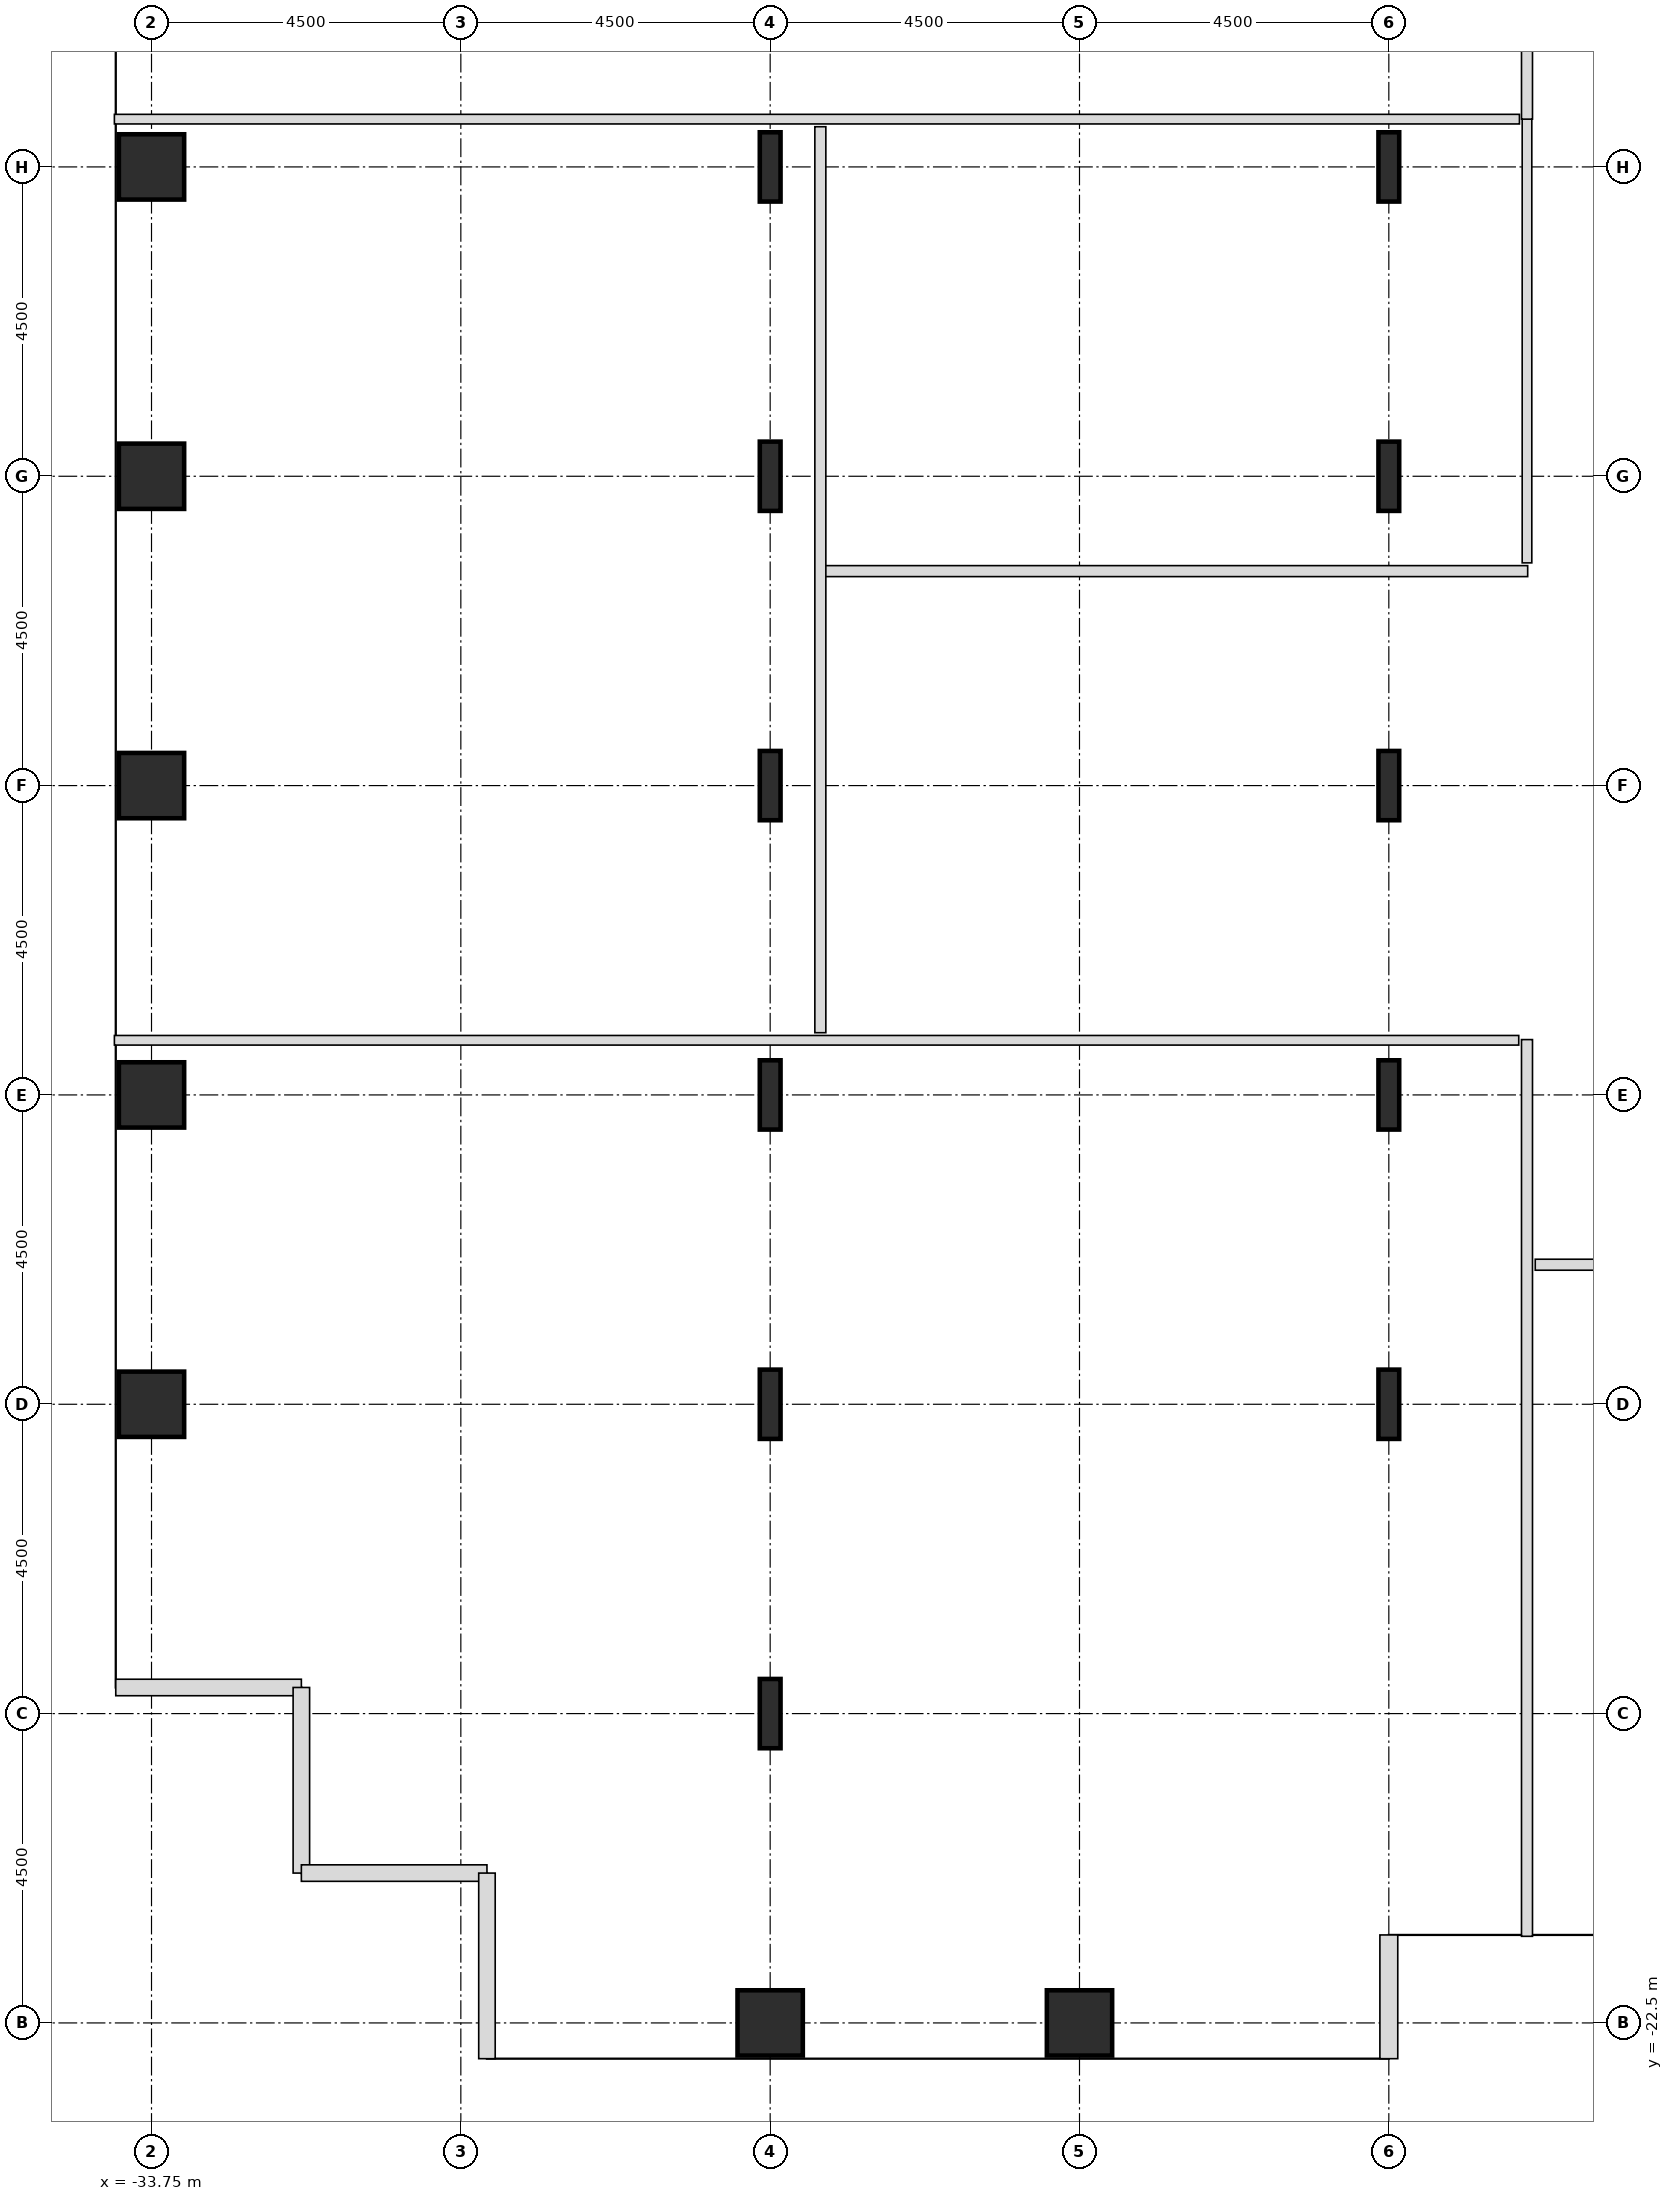
"""IFC4 building model, lengths in metres.
Left out: names, types, materials, properties, quantities, classifications, styles, units other than length and angle.
Written with IfcOpenShell. Run it as: python <this file> out.ifc"""

import sys

from ifc_helpers import new_model, si_unit, direction, frame, frame_2d, origin, origin_2d, place, context, subcontext, project, spatial, rectangle, hollow_rectangle, i_section, extrude, source, transform, mapped, element, fill, save


model = new_model("IFC4")
c1 = context("Model", 3, precision=1e-05, world=origin(), true_north=direction((0.0, 1.0)))
c2 = subcontext(c1, "Body", "Model", "MODEL_VIEW")
j1 = project(units=[si_unit("LENGTHUNIT", "METRE"), si_unit("PLANEANGLEUNIT", "RADIAN")], contexts=[c1])
p1 = place(None, origin())
s1 = spatial("IfcSite", under=j1, at=p1, CompositionType="ELEMENT")
p2 = place(p1, origin())
s2 = spatial("IfcBuilding", under=s1, at=p2, CompositionType="ELEMENT")
p3 = place(p2, frame((0.0, 0.0, 40.6)))
s3 = spatial("IfcBuildingStorey", under=s2, at=p3, CompositionType="ELEMENT", Elevation=40.6)
m1 = source(origin(), c2, "Body", "SweptSolid", [
    extrude(hollow_rectangle(XDim=0.95, YDim=0.95, WallThickness=0.045, InnerFilletRadius=0.045, OuterFilletRadius=0.09, at=origin_2d()), origin(), (0.0, 0.0, 1.0), 3.8),
])
for number, where, z_axis, x_axis in (
    (1, (-33.75, -13.5, 0.0), (0.0, 0.0, 1.0), (1.0, 0.0, 0.0)),
    (2, (-33.75, -9.0, 0.0), (0.0, 0.0, 1.0), (1.0, 0.0, 0.0)),
    (3, (-33.75, -4.5, 0.0), (0.0, 0.0, 1.0), (1.0, 0.0, 0.0)),
    (4, (-33.75, 0.0, 0.0), (0.0, 0.0, 1.0), (1.0, 0.0, 0.0)),
    (5, (-33.75, 4.5, 0.0), (0.0, 0.0, 1.0), (1.0, 0.0, 0.0)),
    (6, (-24.75, -22.5, 0.0), (0.0, 0.0, 1.0), (1.0, 0.0, 0.0)),
):
    element("IfcColumn", number, at=place(p3, frame(where, z_axis=z_axis, x_axis=x_axis)), inside=s3, PredefinedType="COLUMN", context=c2, shape_type="MappedRepresentation", body=[
        mapped(m1, transform((0.0, 0.0, 0.0), x_axis=(1.0, 0.0, 0.0), y_axis=(0.0, 1.0, 0.0), z_axis=(0.0, 0.0, 1.0), scale=1.0)),
    ])
m2 = source(origin(), c2, "Body", "SweptSolid", [
    extrude(i_section(OverallWidth=0.302, OverallDepth=1.008, WebThickness=0.021, FlangeThickness=0.04, FilletRadius=0.03, at=origin_2d()), origin(), (0.0, 0.0, 1.0), 3.8),
])
for number, where, z_axis, x_axis in (
    (7, (-24.75, -18.0, 0.0), (0.0, 0.0, 1.0), (1.0, 0.0, 0.0)),
    (8, (-24.75, -13.5, 0.0), (0.0, 0.0, 1.0), (1.0, 0.0, 0.0)),
    (9, (-24.75, -9.0, 0.0), (0.0, 0.0, 1.0), (1.0, 0.0, 0.0)),
    (10, (-24.75, -4.5, 0.0), (0.0, 0.0, 1.0), (1.0, 0.0, 0.0)),
    (11, (-24.75, 0.0, 0.0), (0.0, 0.0, 1.0), (1.0, 0.0, 0.0)),
    (12, (-24.75, 4.5, 0.0), (0.0, 0.0, 1.0), (1.0, 0.0, 0.0)),
):
    element("IfcColumn", number, at=place(p3, frame(where, z_axis=z_axis, x_axis=x_axis)), inside=s3, PredefinedType="COLUMN", context=c2, shape_type="MappedRepresentation", body=[
        mapped(m2, transform((0.0, 0.0, 0.0), x_axis=(1.0, 0.0, 0.0), y_axis=(0.0, 1.0, 0.0), z_axis=(0.0, 0.0, 1.0), scale=1.0)),
    ])
p4 = place(p3, frame((-20.25, -22.5, 0.0), z_axis=(0.0, 0.0, 1.0), x_axis=(1.0, 0.0, 0.0)))
e13 = element("IfcColumn", 13, at=p4, inside=s3, PredefinedType="COLUMN", context=c2, shape_type="MappedRepresentation", body=[
    mapped(m1, transform((0.0, 0.0, 0.0), x_axis=(1.0, 0.0, 0.0), y_axis=(0.0, 1.0, 0.0), z_axis=(0.0, 0.0, 1.0), scale=1.0)),
])
for number, where, z_axis, x_axis in (
    (14, (-15.75, -13.5, 0.0), (0.0, 0.0, 1.0), (1.0, 0.0, 0.0)),
    (15, (-15.75, -9.0, 0.0), (0.0, 0.0, 1.0), (1.0, 0.0, 0.0)),
    (16, (-15.75, -4.5, 0.0), (0.0, 0.0, 1.0), (1.0, 0.0, 0.0)),
    (17, (-15.75, 0.0, 0.0), (0.0, 0.0, 1.0), (1.0, 0.0, 0.0)),
    (18, (-15.75, 4.5, 0.0), (0.0, 0.0, 1.0), (1.0, 0.0, 0.0)),
):
    element("IfcColumn", number, at=place(p3, frame(where, z_axis=z_axis, x_axis=x_axis)), inside=s3, PredefinedType="COLUMN", context=c2, shape_type="MappedRepresentation", body=[
        mapped(m2, transform((0.0, 0.0, 0.0), x_axis=(1.0, 0.0, 0.0), y_axis=(0.0, 1.0, 0.0), z_axis=(0.0, 0.0, 1.0), scale=1.0)),
    ])
m3 = source(origin(), c2, "Body", "SweptSolid", [
    extrude(rectangle(XDim=2.7, YDim=0.24, at=frame_2d((1.35, 0.0))), origin(), (0.0, 0.0, 1.0), 3.55),
])
p5 = place(p3, frame((-34.27, -17.62, 0.0), z_axis=(0.0, 0.0, 1.0), x_axis=(1.0, 0.0, 0.0)))
e19 = element("IfcWall", 19, at=p5, inside=s3, PredefinedType="SHEAR", context=c2, shape_type="MappedRepresentation", body=[
    mapped(m3, transform((0.0, 0.0, 0.0), x_axis=(1.0, 0.0, 0.0), y_axis=(0.0, 1.0, 0.0), z_axis=(0.0, 0.0, 1.0), scale=1.0)),
])
p6 = place(p3, frame((-31.57, -17.62, 0.0), z_axis=(0.0, 0.0, 1.0), x_axis=(0.0, -1.0, 0.0)))
e20 = element("IfcWall", 20, at=p6, inside=s3, PredefinedType="SHEAR", context=c2, shape_type="MappedRepresentation", body=[
    mapped(m3, transform((0.0, 0.0, 0.0), x_axis=(1.0, 0.0, 0.0), y_axis=(0.0, 1.0, 0.0), z_axis=(0.0, 0.0, 1.0), scale=1.0)),
])
p7 = place(p6, frame((0.75, 0.0, 0.85)))
e21 = element("IfcOpeningElement", 21, at=p7, cuts=e20, PredefinedType="OPENING", context=c2, shape_type="SweptSolid", body=[
    extrude(rectangle(XDim=1.2, YDim=1.8, at=frame_2d((0.6, 0.9))), frame((0.0, 0.13, 0.0), z_axis=(0.0, -1.0, 0.0), x_axis=(1.0, 0.0, 0.0)), (0.0, 0.0, 1.0), 0.26),
])
for number, where, z_axis, x_axis in (
    (22, (-31.57, -20.32, 0.0), (0.0, 0.0, 1.0), (1.0, 0.0, 0.0)),
    (23, (-28.87, -20.32, 0.0), (0.0, 0.0, 1.0), (0.0, -1.0, 0.0)),
):
    element("IfcWall", number, at=place(p3, frame(where, z_axis=z_axis, x_axis=x_axis)), inside=s3, PredefinedType="SHEAR", context=c2, shape_type="MappedRepresentation", body=[
        mapped(m3, transform((0.0, 0.0, 0.0), x_axis=(1.0, 0.0, 0.0), y_axis=(0.0, 1.0, 0.0), z_axis=(0.0, 0.0, 1.0), scale=1.0)),
    ])
m4 = source(origin(), c2, "Body", "SweptSolid", [
    extrude(rectangle(XDim=1.8, YDim=0.26, at=frame_2d((0.9, 0.0))), origin(), (0.0, 0.0, 1.0), 3.55),
])
p8 = place(p3, frame((-15.75, -23.02, 0.0), z_axis=(0.0, 0.0, 1.0), x_axis=(0.0, 1.0, 0.0)))
e24 = element("IfcWall", 24, at=p8, inside=s3, PredefinedType="SOLIDWALL", context=c2, shape_type="MappedRepresentation", body=[
    mapped(m4, transform((0.0, 0.0, 0.0), x_axis=(1.0, 0.0, 0.0), y_axis=(0.0, 1.0, 0.0), z_axis=(0.0, 0.0, 1.0), scale=1.0)),
])
m5 = source(origin(), c2, "Body", "SweptSolid", [
    extrude(rectangle(XDim=13.045, YDim=0.16, at=frame_2d((6.522, 0.0))), origin(), (0.0, 0.0, 1.0), 3.535),
])
p9 = place(p3, frame((-13.74, -21.24, 0.0), z_axis=(0.0, 0.0, 1.0), x_axis=(0.0, 1.0, 0.0)))
e25 = element("IfcWall", 25, at=p9, inside=s3, PredefinedType="PARTITIONING", context=c2, shape_type="MappedRepresentation", body=[
    mapped(m5, transform((0.0, 0.0, 0.0), x_axis=(1.0, 0.0, 0.0), y_axis=(0.0, 1.0, 0.0), z_axis=(0.0, 0.0, 1.0), scale=1.0)),
])
p10 = place(p9, frame((10.913, 0.0, 0.0)))
e26 = element("IfcOpeningElement", 26, at=p10, cuts=e25, PredefinedType="OPENING", context=c2, shape_type="SweptSolid", body=[
    extrude(rectangle(XDim=0.95, YDim=2.1, at=frame_2d((0.475, 1.05))), frame((0.0, 0.09, 0.0), z_axis=(0.0, -1.0, 0.0), x_axis=(1.0, 0.0, 0.0)), (0.0, 0.0, 1.0), 0.18),
])
m6 = source(origin(), c2, "Body", "SweptSolid", [
    extrude(rectangle(XDim=20.43, YDim=0.14, at=frame_2d((10.215, 0.0))), origin(), (0.0, 0.0, 1.0), 3.535),
])
p11 = place(p3, frame((-34.29, -8.205, 0.0), z_axis=(0.0, 0.0, 1.0), x_axis=(1.0, 0.0, 0.0)))
e27 = element("IfcWall", 27, at=p11, inside=s3, PredefinedType="PARTITIONING", context=c2, shape_type="MappedRepresentation", body=[
    mapped(m6, transform((0.0, 0.0, 0.0), x_axis=(1.0, 0.0, 0.0), y_axis=(0.0, 1.0, 0.0), z_axis=(0.0, 0.0, 1.0), scale=1.0)),
])
m7 = source(origin(), c2, "Body", "SweptSolid", [
    extrude(rectangle(XDim=10.25, YDim=0.16, at=frame_2d((5.125, 0.0))), origin(), (0.0, 0.0, 1.0), 3.535),
])
p12 = place(p3, frame((-23.98, -1.38, 0.0), z_axis=(0.0, 0.0, 1.0), x_axis=(1.0, 0.0, 0.0)))
e28 = element("IfcWall", 28, at=p12, inside=s3, PredefinedType="PARTITIONING", context=c2, shape_type="MappedRepresentation", body=[
    mapped(m7, transform((0.0, 0.0, 0.0), x_axis=(1.0, 0.0, 0.0), y_axis=(0.0, 1.0, 0.0), z_axis=(0.0, 0.0, 1.0), scale=1.0)),
])
p13 = place(p12, frame((4.65, 0.0, 0.0)))
e29 = element("IfcOpeningElement", 29, at=p13, cuts=e28, PredefinedType="OPENING", context=c2, shape_type="SweptSolid", body=[
    extrude(rectangle(XDim=0.95, YDim=2.1, at=frame_2d((0.475, 1.05))), frame((0.0, 0.09, 0.0), z_axis=(0.0, -1.0, 0.0), x_axis=(1.0, 0.0, 0.0)), (0.0, 0.0, 1.0), 0.18),
])
m8 = source(origin(), c2, "Body", "SweptSolid", [
    extrude(rectangle(XDim=6.465, YDim=0.14, at=frame_2d((3.232, 0.0))), origin(), (0.0, 0.0, 1.0), 3.535),
])
p14 = place(p3, frame((-13.74, -1.26, 0.0), z_axis=(0.0, 0.0, 1.0), x_axis=(0.0, 1.0, 0.0)))
e30 = element("IfcWall", 30, at=p14, inside=s3, PredefinedType="PARTITIONING", context=c2, shape_type="MappedRepresentation", body=[
    mapped(m8, transform((0.0, 0.0, 0.0), x_axis=(1.0, 0.0, 0.0), y_axis=(0.0, 1.0, 0.0), z_axis=(0.0, 0.0, 1.0), scale=1.0)),
])
m9 = source(origin(), c2, "Body", "SweptSolid", [
    extrude(rectangle(XDim=20.44, YDim=0.14, at=frame_2d((10.22, 0.0))), origin(), (0.0, 0.0, 1.0), 3.535),
])
p15 = place(p3, frame((-34.29, 5.195, 0.0), z_axis=(0.0, 0.0, 1.0), x_axis=(1.0, 0.0, 0.0)))
e31 = element("IfcWall", 31, at=p15, inside=s3, PredefinedType="PARTITIONING", context=c2, shape_type="MappedRepresentation", body=[
    mapped(m9, transform((0.0, 0.0, 0.0), x_axis=(1.0, 0.0, 0.0), y_axis=(0.0, 1.0, 0.0), z_axis=(0.0, 0.0, 1.0), scale=1.0)),
])
m10 = source(origin(), c2, "Body", "SweptSolid", [
    extrude(rectangle(XDim=13.18, YDim=0.16, at=frame_2d((6.59, 0.0))), origin(), (0.0, 0.0, 1.0), 3.535),
])
p16 = place(p3, frame((-24.02, -8.095, 0.0), z_axis=(0.0, 0.0, 1.0), x_axis=(0.0, 1.0, 0.0)))
e32 = element("IfcWall", 32, at=p16, inside=s3, PredefinedType="PARTITIONING", context=c2, shape_type="MappedRepresentation", body=[
    mapped(m10, transform((0.0, 0.0, 0.0), x_axis=(1.0, 0.0, 0.0), y_axis=(0.0, 1.0, 0.0), z_axis=(0.0, 0.0, 1.0), scale=1.0)),
])
p17 = place(p16, frame((5.37, 0.0, 0.0)))
e33 = element("IfcOpeningElement", 33, at=p17, cuts=e32, PredefinedType="OPENING", context=c2, shape_type="SweptSolid", body=[
    extrude(rectangle(XDim=0.95, YDim=2.1, at=frame_2d((0.475, 1.05))), frame((0.0, 0.09, 0.0), z_axis=(0.0, -1.0, 0.0), x_axis=(1.0, 0.0, 0.0)), (0.0, 0.0, 1.0), 0.18),
])
m11 = source(origin(), c2, "Body", "SweptSolid", [
    extrude(rectangle(XDim=16.045, YDim=0.16, at=frame_2d((8.022, 0.0))), origin(), (0.0, 0.0, 1.0), 3.535),
])
p18 = place(p3, frame((-13.74, 5.195, 0.0), z_axis=(0.0, 0.0, 1.0), x_axis=(0.0, 1.0, 0.0)))
e34 = element("IfcWall", 34, at=p18, inside=s3, PredefinedType="PARTITIONING", context=c2, shape_type="MappedRepresentation", body=[
    mapped(m11, transform((0.0, 0.0, 0.0), x_axis=(1.0, 0.0, 0.0), y_axis=(0.0, 1.0, 0.0), z_axis=(0.0, 0.0, 1.0), scale=1.0)),
])
p19 = place(p18, frame((2.683, 0.0, 0.0)))
e35 = element("IfcOpeningElement", 35, at=p19, cuts=e34, PredefinedType="OPENING", context=c2, shape_type="SweptSolid", body=[
    extrude(rectangle(XDim=0.95, YDim=2.1, at=frame_2d((0.475, 1.05))), frame((0.0, 0.09, 0.0), z_axis=(0.0, -1.0, 0.0), x_axis=(1.0, 0.0, 0.0)), (0.0, 0.0, 1.0), 0.18),
])
m12 = source(origin(), c2, "Body", "SweptSolid", [
    extrude(rectangle(XDim=4.425, YDim=0.16, at=frame_2d((2.212, 0.0))), origin(), (0.0, 0.0, 1.0), 3.535),
])
p20 = place(p3, frame((-13.62, -11.47, 0.0), z_axis=(0.0, 0.0, 1.0), x_axis=(1.0, 0.0, 0.0)))
e36 = element("IfcWall", 36, at=p20, inside=s3, PredefinedType="PARTITIONING", context=c2, shape_type="MappedRepresentation", body=[
    mapped(m12, transform((0.0, 0.0, 0.0), x_axis=(1.0, 0.0, 0.0), y_axis=(0.0, 1.0, 0.0), z_axis=(0.0, 0.0, 1.0), scale=1.0)),
])
p21 = place(p20, frame((1.738, 0.0, 0.0)))
e37 = element("IfcOpeningElement", 37, at=p21, cuts=e36, PredefinedType="OPENING", context=c2, shape_type="SweptSolid", body=[
    extrude(rectangle(XDim=0.95, YDim=2.1, at=frame_2d((0.475, 1.05))), frame((0.0, 0.09, 0.0), z_axis=(0.0, -1.0, 0.0), x_axis=(1.0, 0.0, 0.0)), (0.0, 0.0, 1.0), 0.18),
])
m13 = source(origin(), c2, "Body", "SweptSolid", [
    extrude(rectangle(XDim=1.2, YDim=1.8, at=frame_2d((0.6, 0.9))), frame((0.0, 0.03, 0.0), z_axis=(0.0, -1.0, 0.0), x_axis=(1.0, 0.0, 0.0)), (0.0, 0.0, 1.0), 0.06),
])
p22 = place(p7, origin())
e38 = element("IfcWindow", 38, at=p22, inside=s3, PartitioningType="SINGLE_PANEL", PredefinedType="WINDOW", context=c2, shape_type="MappedRepresentation", body=[
    mapped(m13, transform((0.0, 0.0, 0.0), x_axis=(1.0, 0.0, 0.0), y_axis=(0.0, 1.0, 0.0), z_axis=(0.0, 0.0, 1.0), scale=1.0)),
])
fill(e21, e38)
m14 = source(origin(), c2, "Body", "SweptSolid", [
    extrude(rectangle(XDim=0.95, YDim=2.1, at=frame_2d((0.475, 1.05))), frame((0.0, 0.025, 0.0), z_axis=(0.0, -1.0, 0.0), x_axis=(1.0, 0.0, 0.0)), (0.0, 0.0, 1.0), 0.05),
])
p23 = place(p10, origin())
e39 = element("IfcDoor", 39, at=p23, inside=s3, OperationType="SINGLE_SWING_LEFT", PredefinedType="DOOR", context=c2, shape_type="MappedRepresentation", body=[
    mapped(m14, transform((0.0, 0.0, 0.0), x_axis=(1.0, 0.0, 0.0), y_axis=(0.0, 1.0, 0.0), z_axis=(0.0, 0.0, 1.0), scale=1.0)),
])
fill(e26, e39)
p24 = place(p13, origin())
e40 = element("IfcDoor", 40, at=p24, inside=s3, OperationType="SINGLE_SWING_RIGHT", PredefinedType="DOOR", context=c2, shape_type="MappedRepresentation", body=[
    mapped(m14, transform((0.0, 0.0, 0.0), x_axis=(1.0, 0.0, 0.0), y_axis=(0.0, 1.0, 0.0), z_axis=(0.0, 0.0, 1.0), scale=1.0)),
])
fill(e29, e40)
p25 = place(p17, origin())
e41 = element("IfcDoor", 41, at=p25, inside=s3, OperationType="SINGLE_SWING_LEFT", PredefinedType="DOOR", context=c2, shape_type="MappedRepresentation", body=[
    mapped(m14, transform((0.0, 0.0, 0.0), x_axis=(1.0, 0.0, 0.0), y_axis=(0.0, 1.0, 0.0), z_axis=(0.0, 0.0, 1.0), scale=1.0)),
])
fill(e33, e41)
save(model, sys.argv[1])
